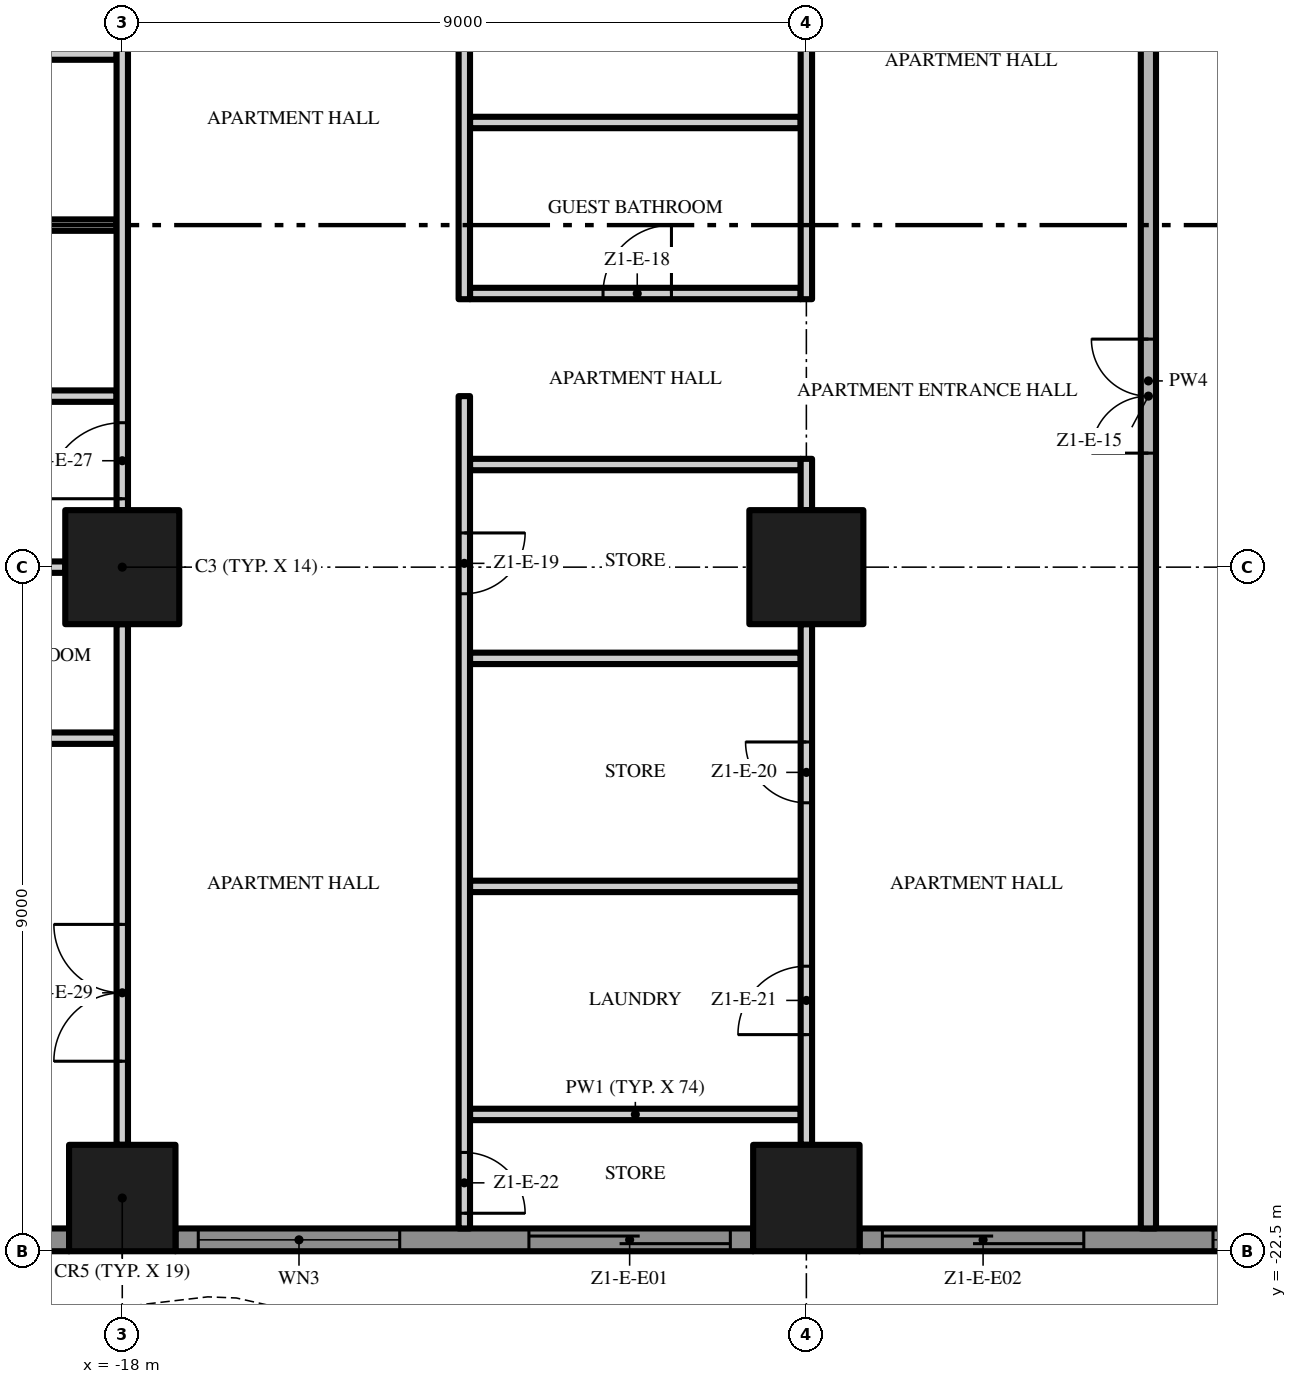
"""IFC4 building model, lengths in metres.
Left out: names, types, materials, properties, quantities, classifications, styles, units other than length and angle.
Written with IfcOpenShell. Run it as: python <this file> out.ifc"""

import sys

from ifc_helpers import new_model, si_unit, direction, frame, frame_2d, origin, origin_2d, place, context, subcontext, project, spatial, polyline, rectangle, outline, extrude, element, fill, save


model = new_model("IFC4")
c1 = context("Model", 3, precision=1e-05, world=origin(), true_north=direction((0.0, 1.0)))
c2 = subcontext(c1, "Body", "Model", "MODEL_VIEW")
j1 = project(units=[si_unit("LENGTHUNIT", "METRE"), si_unit("PLANEANGLEUNIT", "RADIAN")], contexts=[c1])
p1 = place(None, origin())
s1 = spatial("IfcSite", under=j1, at=p1, CompositionType="ELEMENT")
p2 = place(p1, origin())
s2 = spatial("IfcBuilding", under=s1, at=p2, CompositionType="ELEMENT")
p3 = place(p2, frame((0.0, 0.0, 56.8)))
s3 = spatial("IfcBuildingStorey", under=s2, at=p3, CompositionType="ELEMENT", Elevation=56.8)
p4 = place(p3, frame((-18.0, -13.5, 0.0), z_axis=(0.0, 0.0, 1.0), x_axis=(1.0, 0.0, 0.0)))
e1 = element("IfcColumn", 1, at=p4, inside=s3, PredefinedType="COLUMN", context=c2, shape_type="SweptSolid", body=[
    extrude(rectangle(XDim=1.5, YDim=1.5, at=origin_2d()), origin(), (0.0, 0.0, 1.0), 3.5),
])
p5 = place(p3, frame((-18.0, -21.8, 0.0), z_axis=(0.0, 0.0, 1.0), x_axis=(1.0, 0.0, 0.0)))
e2 = element("IfcColumn", 2, at=p5, inside=s3, PredefinedType="COLUMN", context=c2, shape_type="SweptSolid", body=[
    extrude(rectangle(XDim=1.4, YDim=1.4, at=origin_2d()), origin(), (0.0, 0.0, 1.0), 3.5),
])
p6 = place(p3, frame((-9.0, -13.5, 0.0), z_axis=(0.0, 0.0, 1.0), x_axis=(1.0, 0.0, 0.0)))
e3 = element("IfcColumn", 3, at=p6, inside=s3, PredefinedType="COLUMN", context=c2, shape_type="SweptSolid", body=[
    extrude(rectangle(XDim=1.5, YDim=1.5, at=origin_2d()), origin(), (0.0, 0.0, 1.0), 3.5),
])
p7 = place(p3, frame((-9.0, -21.8, 0.0), z_axis=(0.0, 0.0, 1.0), x_axis=(1.0, 0.0, 0.0)))
e4 = element("IfcColumn", 4, at=p7, inside=s3, PredefinedType="COLUMN", context=c2, shape_type="SweptSolid", body=[
    extrude(rectangle(XDim=1.4, YDim=1.4, at=origin_2d()), origin(), (0.0, 0.0, 1.0), 3.5),
])
p8 = place(p3, frame((-18.7, -22.35, 0.0), z_axis=(0.0, 0.0, 1.0), x_axis=(-1.0, 0.0, 0.0)))
e5 = element("IfcWall", 5, at=p8, inside=s3, PredefinedType="SOLIDWALL", context=c2, shape_type="SweptSolid", body=[
    extrude(rectangle(XDim=3.5, YDim=0.3, at=frame_2d((1.75, 0.0))), origin(), (0.0, 0.0, 1.0), 3.5),
])
p9 = place(p8, frame((0.3, 0.0, 0.45)))
e6 = element("IfcOpeningElement", 6, at=p9, cuts=e5, PredefinedType="OPENING", context=c2, shape_type="SweptSolid", body=[
    extrude(rectangle(XDim=2.65, YDim=2.65, at=frame_2d((1.325, 1.325))), frame((0.0, 0.16, 0.0), z_axis=(0.0, -1.0, 0.0), x_axis=(1.0, 0.0, 0.0)), (0.0, 0.0, 1.0), 0.32),
])
p10 = place(p3, frame((-9.7, -22.35, 0.0), z_axis=(0.0, 0.0, 1.0), x_axis=(-1.0, 0.0, 0.0)))
e7 = element("IfcWall", 7, at=p10, inside=s3, PredefinedType="SOLIDWALL", context=c2, shape_type="SweptSolid", body=[
    extrude(rectangle(XDim=7.6, YDim=0.3, at=frame_2d((3.8, 0.0))), origin(), (0.0, 0.0, 1.0), 3.5),
])
p11 = place(p10, frame((4.65, 0.0, 0.45)))
e8 = element("IfcOpeningElement", 8, at=p11, cuts=e7, PredefinedType="OPENING", context=c2, shape_type="SweptSolid", body=[
    extrude(rectangle(XDim=2.65, YDim=2.65, at=frame_2d((1.325, 1.325))), frame((0.0, 0.16, 0.0), z_axis=(0.0, -1.0, 0.0), x_axis=(1.0, 0.0, 0.0)), (0.0, 0.0, 1.0), 0.32),
])
p12 = place(p10, frame((0.3, 0.0, 0.0)))
e9 = element("IfcOpeningElement", 9, at=p12, cuts=e7, PredefinedType="OPENING", context=c2, shape_type="SweptSolid", body=[
    extrude(rectangle(XDim=2.65, YDim=2.4, at=frame_2d((1.325, 1.2))), frame((0.0, 0.16, 0.0), z_axis=(0.0, -1.0, 0.0), x_axis=(1.0, 0.0, 0.0)), (0.0, 0.0, 1.0), 0.32),
])
p13 = place(p3, frame((-0.7, -22.35, 0.0), z_axis=(0.0, 0.0, 1.0), x_axis=(-1.0, 0.0, 0.0)))
e10 = element("IfcWall", 10, at=p13, inside=s3, PredefinedType="SOLIDWALL", context=c2, shape_type="SweptSolid", body=[
    extrude(rectangle(XDim=7.6, YDim=0.3, at=frame_2d((3.8, 0.0))), origin(), (0.0, 0.0, 1.0), 3.5),
])
p14 = place(p13, frame((4.65, 0.0, 0.0)))
e11 = element("IfcOpeningElement", 11, at=p14, cuts=e10, PredefinedType="OPENING", context=c2, shape_type="SweptSolid", body=[
    extrude(rectangle(XDim=2.65, YDim=2.4, at=frame_2d((1.325, 1.2))), frame((0.0, 0.16, 0.0), z_axis=(0.0, -1.0, 0.0), x_axis=(1.0, 0.0, 0.0)), (0.0, 0.0, 1.0), 0.32),
])
p15 = place(p13, frame((0.3, 0.0, 0.45)))
e12 = element("IfcOpeningElement", 12, at=p15, cuts=e10, PredefinedType="OPENING", context=c2, shape_type="SweptSolid", body=[
    extrude(rectangle(XDim=2.65, YDim=2.65, at=frame_2d((1.325, 1.325))), frame((0.0, 0.16, 0.0), z_axis=(0.0, -1.0, 0.0), x_axis=(1.0, 0.0, 0.0)), (0.0, 0.0, 1.0), 0.32),
])
p16 = place(p3, origin())
e13 = element("IfcWall", 13, at=p16, inside=s3, PredefinedType="USERDEFINED", context=c2, shape_type="SweptSolid", body=[
    extrude(outline(polyline([(-22.5, -25.149), (-21.0, -24.488), (-19.5, -23.755), (-18.0, -23.231), (-16.875, -23.1), (-16.5, -23.115), (-15.0, -23.451), (-13.5, -24.112), (-12.0, -24.845), (-10.5, -25.369), (-9.375, -25.5), (-9.0, -25.485), (-7.5, -25.149), (-6.0, -24.488), (-4.5, -23.755), (-3.0, -23.231), (-1.875, -23.1), (-1.5, -23.115), (0.0, -23.451), (1.5, -24.112), (3.0, -24.845), (4.5, -25.369), (5.625, -25.5), (6.0, -25.485), (7.5, -25.149), (9.0, -24.488), (10.5, -23.755), (12.0, -23.231), (13.125, -23.1), (13.5, -23.115), (15.0, -23.451), (16.5, -24.112), (18.0, -24.845), (19.5, -25.369), (20.625, -25.5), (21.0, -25.485), (22.5, -25.149), (22.445, -24.905), (20.967, -25.236), (20.635, -25.249), (19.556, -25.124), (18.096, -24.614), (16.605, -23.885), (15.079, -23.213), (13.533, -22.866), (13.115, -22.849), (11.944, -22.986), (10.404, -23.524), (8.895, -24.261), (7.421, -24.91), (5.967, -25.236), (5.635, -25.249), (4.556, -25.124), (3.096, -24.614), (1.605, -23.885), (0.079, -23.213), (-1.467, -22.866), (-1.885, -22.849), (-3.056, -22.986), (-4.596, -23.524), (-6.105, -24.261), (-7.579, -24.91), (-9.033, -25.236), (-9.365, -25.249), (-10.444, -25.124), (-11.904, -24.614), (-13.395, -23.885), (-14.921, -23.213), (-16.467, -22.866), (-16.885, -22.849), (-18.056, -22.986), (-19.596, -23.524), (-21.105, -24.261), (-22.601, -24.92), (-22.5, -25.149)])), origin(), (0.0, 0.0, 1.0), 0.9),
])
for number, where, z_axis, x_axis in (
    (14, (-13.425, -20.7, 0.0), (0.0, 0.0, 1.0), (1.0, 0.0, 0.0)),
    (15, (-13.425, -17.7, 0.0), (0.0, 0.0, 1.0), (1.0, 0.0, 0.0)),
):
    element("IfcWall", number, at=place(p3, frame(where, z_axis=z_axis, x_axis=x_axis)), inside=s3, PredefinedType="PARTITIONING", context=c2, shape_type="SweptSolid", body=[
        extrude(rectangle(XDim=4.35, YDim=0.15, at=frame_2d((2.175, 0.0))), origin(), (0.0, 0.0, 1.0), 3.5),
    ])
p17 = place(p3, frame((-20.925, -15.75, 0.0), z_axis=(0.0, 0.0, 1.0), x_axis=(1.0, 0.0, 0.0)))
e16 = element("IfcWall", 16, at=p17, inside=s3, PredefinedType="PARTITIONING", context=c2, shape_type="SweptSolid", body=[
    extrude(rectangle(XDim=2.85, YDim=0.15, at=frame_2d((1.425, 0.0))), origin(), (0.0, 0.0, 1.0), 3.5),
])
p18 = place(p3, frame((-13.425, -14.7, 0.0), z_axis=(0.0, 0.0, 1.0), x_axis=(1.0, 0.0, 0.0)))
e17 = element("IfcWall", 17, at=p18, inside=s3, PredefinedType="PARTITIONING", context=c2, shape_type="SweptSolid", body=[
    extrude(rectangle(XDim=4.35, YDim=0.15, at=frame_2d((2.175, 0.0))), origin(), (0.0, 0.0, 1.0), 3.5),
])
p19 = place(p3, frame((-25.6, -13.5, 0.0), z_axis=(0.0, 0.0, 1.0), x_axis=(1.0, 0.0, 0.0)))
e18 = element("IfcWall", 18, at=p19, inside=s3, PredefinedType="PARTITIONING", context=c2, shape_type="SweptSolid", body=[
    extrude(rectangle(XDim=6.85, YDim=0.15, at=frame_2d((3.425, 0.0))), origin(), (0.0, 0.0, 1.0), 3.5),
])
p20 = place(p3, frame((-13.425, -12.15, 0.0), z_axis=(0.0, 0.0, 1.0), x_axis=(1.0, 0.0, 0.0)))
e19 = element("IfcWall", 19, at=p20, inside=s3, PredefinedType="PARTITIONING", context=c2, shape_type="SweptSolid", body=[
    extrude(rectangle(XDim=4.35, YDim=0.15, at=frame_2d((2.175, 0.0))), origin(), (0.0, 0.0, 1.0), 3.5),
])
p21 = place(p3, frame((-20.925, -11.25, 0.0), z_axis=(0.0, 0.0, 1.0), x_axis=(1.0, 0.0, 0.0)))
e20 = element("IfcWall", 20, at=p21, inside=s3, PredefinedType="PARTITIONING", context=c2, shape_type="SweptSolid", body=[
    extrude(rectangle(XDim=2.85, YDim=0.15, at=frame_2d((1.425, 0.0))), origin(), (0.0, 0.0, 1.0), 3.5),
])
p22 = place(p3, frame((-13.425, -9.9, 0.0), z_axis=(0.0, 0.0, 1.0), x_axis=(1.0, 0.0, 0.0)))
e21 = element("IfcWall", 21, at=p22, inside=s3, PredefinedType="PARTITIONING", context=c2, shape_type="SweptSolid", body=[
    extrude(rectangle(XDim=4.35, YDim=0.15, at=frame_2d((2.175, 0.0))), origin(), (0.0, 0.0, 1.0), 3.5),
])
p23 = place(p22, frame((1.75, 0.0, 0.0)))
e22 = element("IfcOpeningElement", 22, at=p23, cuts=e21, PredefinedType="OPENING", context=c2, shape_type="SweptSolid", body=[
    extrude(rectangle(XDim=0.9, YDim=2.1, at=frame_2d((0.45, 1.05))), frame((0.0, 0.085, 0.0), z_axis=(0.0, -1.0, 0.0), x_axis=(1.0, 0.0, 0.0)), (0.0, 0.0, 1.0), 0.17),
])
p24 = place(p3, frame((-20.925, -9.0, 0.0), z_axis=(0.0, 0.0, 1.0), x_axis=(1.0, 0.0, 0.0)))
e23 = element("IfcWall", 23, at=p24, inside=s3, PredefinedType="PARTITIONING", context=c2, shape_type="SweptSolid", body=[
    extrude(rectangle(XDim=2.85, YDim=0.15, at=frame_2d((1.425, 0.0))), origin(), (0.0, 0.0, 1.0), 3.5),
])
p25 = place(p3, frame((-13.425, -7.65, 0.0), z_axis=(0.0, 0.0, 1.0), x_axis=(1.0, 0.0, 0.0)))
e24 = element("IfcWall", 24, at=p25, inside=s3, PredefinedType="PARTITIONING", context=c2, shape_type="SweptSolid", body=[
    extrude(rectangle(XDim=4.35, YDim=0.15, at=frame_2d((2.175, 0.0))), origin(), (0.0, 0.0, 1.0), 3.5),
])
p26 = place(p3, frame((-20.925, -6.75, 0.0), z_axis=(0.0, 0.0, 1.0), x_axis=(1.0, 0.0, 0.0)))
e25 = element("IfcWall", 25, at=p26, inside=s3, PredefinedType="PARTITIONING", context=c2, shape_type="SweptSolid", body=[
    extrude(rectangle(XDim=2.85, YDim=0.15, at=frame_2d((1.425, 0.0))), origin(), (0.0, 0.0, 1.0), 3.5),
])
p27 = place(p3, frame((-18.0, -21.1, 0.0), z_axis=(0.0, 0.0, 1.0), x_axis=(0.0, 1.0, 0.0)))
e26 = element("IfcWall", 26, at=p27, inside=s3, PredefinedType="PARTITIONING", context=c2, shape_type="SweptSolid", body=[
    extrude(rectangle(XDim=6.85, YDim=0.15, at=frame_2d((3.425, 0.0))), origin(), (0.0, 0.0, 1.0), 3.5),
])
p28 = place(p27, frame((1.1, 0.0, 0.0)))
e27 = element("IfcOpeningElement", 27, at=p28, cuts=e26, PredefinedType="OPENING", context=c2, shape_type="SweptSolid", body=[
    extrude(rectangle(XDim=1.8, YDim=2.4, at=frame_2d((0.9, 1.2))), frame((0.0, 0.085, 0.0), z_axis=(0.0, -1.0, 0.0), x_axis=(1.0, 0.0, 0.0)), (0.0, 0.0, 1.0), 0.17),
])
p29 = place(p3, frame((-18.0, -12.75, 0.0), z_axis=(0.0, 0.0, 1.0), x_axis=(0.0, 1.0, 0.0)))
e28 = element("IfcWall", 28, at=p29, inside=s3, PredefinedType="PARTITIONING", context=c2, shape_type="SweptSolid", body=[
    extrude(rectangle(XDim=7.5, YDim=0.15, at=frame_2d((3.75, 0.0))), origin(), (0.0, 0.0, 1.0), 3.5),
])
p30 = place(p29, frame((6.35, 0.0, 0.0)))
e29 = element("IfcOpeningElement", 29, at=p30, cuts=e28, PredefinedType="OPENING", context=c2, shape_type="SweptSolid", body=[
    extrude(rectangle(XDim=1.0, YDim=2.4, at=frame_2d((0.5, 1.2))), frame((0.0, 0.085, 0.0), z_axis=(0.0, -1.0, 0.0), x_axis=(1.0, 0.0, 0.0)), (0.0, 0.0, 1.0), 0.17),
])
p31 = place(p29, frame((0.15, 0.0, 0.0)))
e30 = element("IfcOpeningElement", 30, at=p31, cuts=e28, PredefinedType="OPENING", context=c2, shape_type="SweptSolid", body=[
    extrude(rectangle(XDim=1.0, YDim=2.4, at=frame_2d((0.5, 1.2))), frame((0.0, 0.085, 0.0), z_axis=(0.0, -1.0, 0.0), x_axis=(1.0, 0.0, 0.0)), (0.0, 0.0, 1.0), 0.17),
])
p32 = place(p3, frame((-13.5, -11.25, 0.0), z_axis=(0.0, 0.0, 1.0), x_axis=(0.0, -1.0, 0.0)))
e31 = element("IfcWall", 31, at=p32, inside=s3, PredefinedType="PARTITIONING", context=c2, shape_type="SweptSolid", body=[
    extrude(rectangle(XDim=10.95, YDim=0.15, at=frame_2d((5.475, 0.0))), origin(), (0.0, 0.0, 1.0), 3.5),
])
p33 = place(p32, frame((1.8, 0.0, 0.0)))
e32 = element("IfcOpeningElement", 32, at=p33, cuts=e31, PredefinedType="OPENING", context=c2, shape_type="SweptSolid", body=[
    extrude(rectangle(XDim=0.8, YDim=2.0, at=frame_2d((0.4, 1.0))), frame((0.0, 0.085, 0.0), z_axis=(0.0, -1.0, 0.0), x_axis=(1.0, 0.0, 0.0)), (0.0, 0.0, 1.0), 0.17),
])
p34 = place(p32, frame((9.95, 0.0, 0.0)))
e33 = element("IfcOpeningElement", 33, at=p34, cuts=e31, PredefinedType="OPENING", context=c2, shape_type="SweptSolid", body=[
    extrude(rectangle(XDim=0.8, YDim=2.0, at=frame_2d((0.4, 1.0))), frame((0.0, 0.085, 0.0), z_axis=(0.0, -1.0, 0.0), x_axis=(1.0, 0.0, 0.0)), (0.0, 0.0, 1.0), 0.17),
])
p35 = place(p3, frame((-13.5, -9.975, 0.0), z_axis=(0.0, 0.0, 1.0), x_axis=(0.0, 1.0, 0.0)))
e34 = element("IfcWall", 34, at=p35, inside=s3, PredefinedType="PARTITIONING", context=c2, shape_type="SweptSolid", body=[
    extrude(rectangle(XDim=9.875, YDim=0.15, at=frame_2d((4.938, 0.0))), origin(), (0.0, 0.0, 1.0), 3.5),
])
p36 = place(p3, frame((-9.0, -21.1, 0.0), z_axis=(0.0, 0.0, 1.0), x_axis=(0.0, 1.0, 0.0)))
e35 = element("IfcWall", 35, at=p36, inside=s3, PredefinedType="PARTITIONING", context=c2, shape_type="SweptSolid", body=[
    extrude(rectangle(XDim=6.85, YDim=0.15, at=frame_2d((3.425, 0.0))), origin(), (0.0, 0.0, 1.0), 3.5),
])
p37 = place(p36, frame((4.5, 0.0, 0.0)))
e36 = element("IfcOpeningElement", 36, at=p37, cuts=e35, PredefinedType="OPENING", context=c2, shape_type="SweptSolid", body=[
    extrude(rectangle(XDim=0.8, YDim=2.0, at=frame_2d((0.4, 1.0))), frame((0.0, 0.085, 0.0), z_axis=(0.0, -1.0, 0.0), x_axis=(1.0, 0.0, 0.0)), (0.0, 0.0, 1.0), 0.17),
])
p38 = place(p36, frame((1.45, 0.0, 0.0)))
e37 = element("IfcOpeningElement", 37, at=p38, cuts=e35, PredefinedType="OPENING", context=c2, shape_type="SweptSolid", body=[
    extrude(rectangle(XDim=0.9, YDim=2.1, at=frame_2d((0.45, 1.05))), frame((0.0, 0.085, 0.0), z_axis=(0.0, -1.0, 0.0), x_axis=(1.0, 0.0, 0.0)), (0.0, 0.0, 1.0), 0.17),
])
p39 = place(p3, frame((-9.0, -12.75, 0.0), z_axis=(0.0, 0.0, 1.0), x_axis=(0.0, 1.0, 0.0)))
e38 = element("IfcWall", 38, at=p39, inside=s3, PredefinedType="PARTITIONING", context=c2, shape_type="SweptSolid", body=[
    extrude(rectangle(XDim=0.675, YDim=0.15, at=frame_2d((0.338, 0.0))), origin(), (0.0, 0.0, 1.0), 3.5),
])
p40 = place(p3, frame((-9.0, -9.975, 0.0), z_axis=(0.0, 0.0, 1.0), x_axis=(0.0, 1.0, 0.0)))
e39 = element("IfcWall", 39, at=p40, inside=s3, PredefinedType="PARTITIONING", context=c2, shape_type="SweptSolid", body=[
    extrude(rectangle(XDim=4.725, YDim=0.15, at=frame_2d((2.362, 0.0))), origin(), (0.0, 0.0, 1.0), 3.5),
])
p41 = place(p40, frame((3.575, 0.0, 0.0)))
e40 = element("IfcOpeningElement", 40, at=p41, cuts=e39, PredefinedType="OPENING", context=c2, shape_type="SweptSolid", body=[
    extrude(rectangle(XDim=1.0, YDim=2.4, at=frame_2d((0.5, 1.2))), frame((0.0, 0.085, 0.0), z_axis=(0.0, -1.0, 0.0), x_axis=(1.0, 0.0, 0.0)), (0.0, 0.0, 1.0), 0.17),
])
p42 = place(p3, frame((-4.5, -22.2, 0.0), z_axis=(0.0, 0.0, 1.0), x_axis=(0.0, 1.0, 0.0)))
e41 = element("IfcWall", 41, at=p42, inside=s3, PredefinedType="PARTITIONING", context=c2, shape_type="SweptSolid", body=[
    extrude(rectangle(XDim=22.3, YDim=0.2, at=frame_2d((11.15, 0.0))), origin(), (0.0, 0.0, 1.0), 3.5),
])
p43 = place(p42, frame((10.2, 0.0, 0.0)))
e42 = element("IfcOpeningElement", 42, at=p43, cuts=e41, PredefinedType="OPENING", context=c2, shape_type="SweptSolid", body=[
    extrude(rectangle(XDim=1.5, YDim=2.4, at=frame_2d((0.75, 1.2))), frame((0.0, 0.11, 0.0), z_axis=(0.0, -1.0, 0.0), x_axis=(1.0, 0.0, 0.0)), (0.0, 0.0, 1.0), 0.22),
])
p44 = place(p11, origin())
e43 = element("IfcWindow", 43, at=p44, inside=s3, PartitioningType="SINGLE_PANEL", PredefinedType="WINDOW", context=c2, shape_type="SweptSolid", body=[
    extrude(rectangle(XDim=2.65, YDim=2.65, at=frame_2d((1.325, 1.325))), frame((0.0, 0.03, 0.0), z_axis=(0.0, -1.0, 0.0), x_axis=(1.0, 0.0, 0.0)), (0.0, 0.0, 1.0), 0.06),
])
fill(e8, e43)
p45 = place(p12, origin())
e44 = element("IfcDoor", 44, at=p45, inside=s3, OperationType="SINGLE_SWING_LEFT", PredefinedType="DOOR", context=c2, shape_type="SweptSolid", body=[
    extrude(rectangle(XDim=2.65, YDim=2.4, at=frame_2d((1.325, 1.2))), frame((0.0, 0.025, 0.0), z_axis=(0.0, -1.0, 0.0), x_axis=(1.0, 0.0, 0.0)), (0.0, 0.0, 1.0), 0.05),
])
fill(e9, e44)
p46 = place(p14, origin())
e45 = element("IfcDoor", 45, at=p46, inside=s3, OperationType="SINGLE_SWING_LEFT", PredefinedType="DOOR", context=c2, shape_type="SweptSolid", body=[
    extrude(rectangle(XDim=2.65, YDim=2.4, at=frame_2d((1.325, 1.2))), frame((0.0, 0.025, 0.0), z_axis=(0.0, -1.0, 0.0), x_axis=(1.0, 0.0, 0.0)), (0.0, 0.0, 1.0), 0.05),
])
fill(e11, e45)
p47 = place(p15, origin())
e46 = element("IfcWindow", 46, at=p47, inside=s3, PartitioningType="SINGLE_PANEL", PredefinedType="WINDOW", context=c2, shape_type="SweptSolid", body=[
    extrude(rectangle(XDim=2.65, YDim=2.65, at=frame_2d((1.325, 1.325))), frame((0.0, 0.03, 0.0), z_axis=(0.0, -1.0, 0.0), x_axis=(1.0, 0.0, 0.0)), (0.0, 0.0, 1.0), 0.06),
])
fill(e12, e46)
p48 = place(p43, origin())
e47 = element("IfcDoor", 47, at=p48, inside=s3, OperationType="DOUBLE_DOOR_SINGLE_SWING", PredefinedType="DOOR", context=c2, shape_type="SweptSolid", body=[
    extrude(rectangle(XDim=1.5, YDim=2.4, at=frame_2d((0.75, 1.2))), frame((0.0, 0.025, 0.0), z_axis=(0.0, -1.0, 0.0), x_axis=(1.0, 0.0, 0.0)), (0.0, 0.0, 1.0), 0.05),
])
fill(e42, e47)
p49 = place(p23, origin())
e48 = element("IfcDoor", 48, at=p49, inside=s3, OperationType="SINGLE_SWING_RIGHT", PredefinedType="DOOR", context=c2, shape_type="SweptSolid", body=[
    extrude(rectangle(XDim=0.9, YDim=2.1, at=frame_2d((0.45, 1.05))), frame((0.0, 0.025, 0.0), z_axis=(0.0, -1.0, 0.0), x_axis=(1.0, 0.0, 0.0)), (0.0, 0.0, 1.0), 0.05),
])
fill(e22, e48)
p50 = place(p33, origin())
e49 = element("IfcDoor", 49, at=p50, inside=s3, OperationType="SINGLE_SWING_LEFT", PredefinedType="DOOR", context=c2, shape_type="SweptSolid", body=[
    extrude(rectangle(XDim=0.8, YDim=2.0, at=frame_2d((0.4, 1.0))), frame((0.0, 0.025, 0.0), z_axis=(0.0, -1.0, 0.0), x_axis=(1.0, 0.0, 0.0)), (0.0, 0.0, 1.0), 0.05),
])
fill(e32, e49)
p51 = place(p37, origin())
e50 = element("IfcDoor", 50, at=p51, inside=s3, OperationType="SINGLE_SWING_RIGHT", PredefinedType="DOOR", context=c2, shape_type="SweptSolid", body=[
    extrude(rectangle(XDim=0.8, YDim=2.0, at=frame_2d((0.4, 1.0))), frame((0.0, 0.025, 0.0), z_axis=(0.0, -1.0, 0.0), x_axis=(1.0, 0.0, 0.0)), (0.0, 0.0, 1.0), 0.05),
])
fill(e36, e50)
p52 = place(p38, origin())
e51 = element("IfcDoor", 51, at=p52, inside=s3, OperationType="SINGLE_SWING_LEFT", PredefinedType="DOOR", context=c2, shape_type="SweptSolid", body=[
    extrude(rectangle(XDim=0.9, YDim=2.1, at=frame_2d((0.45, 1.05))), frame((0.0, 0.025, 0.0), z_axis=(0.0, -1.0, 0.0), x_axis=(1.0, 0.0, 0.0)), (0.0, 0.0, 1.0), 0.05),
])
fill(e37, e51)
p53 = place(p34, origin())
e52 = element("IfcDoor", 52, at=p53, inside=s3, OperationType="SINGLE_SWING_RIGHT", PredefinedType="DOOR", context=c2, shape_type="SweptSolid", body=[
    extrude(rectangle(XDim=0.8, YDim=2.0, at=frame_2d((0.4, 1.0))), frame((0.0, 0.025, 0.0), z_axis=(0.0, -1.0, 0.0), x_axis=(1.0, 0.0, 0.0)), (0.0, 0.0, 1.0), 0.05),
])
fill(e33, e52)
p54 = place(p31, origin())
e53 = element("IfcDoor", 53, at=p54, inside=s3, OperationType="SINGLE_SWING_LEFT", PredefinedType="DOOR", context=c2, shape_type="SweptSolid", body=[
    extrude(rectangle(XDim=1.0, YDim=2.4, at=frame_2d((0.5, 1.2))), frame((0.0, 0.025, 0.0), z_axis=(0.0, -1.0, 0.0), x_axis=(1.0, 0.0, 0.0)), (0.0, 0.0, 1.0), 0.05),
])
fill(e30, e53)
p55 = place(p28, origin())
e54 = element("IfcDoor", 54, at=p55, inside=s3, OperationType="DOUBLE_DOOR_SINGLE_SWING", PredefinedType="DOOR", context=c2, shape_type="SweptSolid", body=[
    extrude(rectangle(XDim=1.8, YDim=2.4, at=frame_2d((0.9, 1.2))), frame((0.0, 0.025, 0.0), z_axis=(0.0, -1.0, 0.0), x_axis=(1.0, 0.0, 0.0)), (0.0, 0.0, 1.0), 0.05),
])
fill(e27, e54)
save(model, sys.argv[1])
